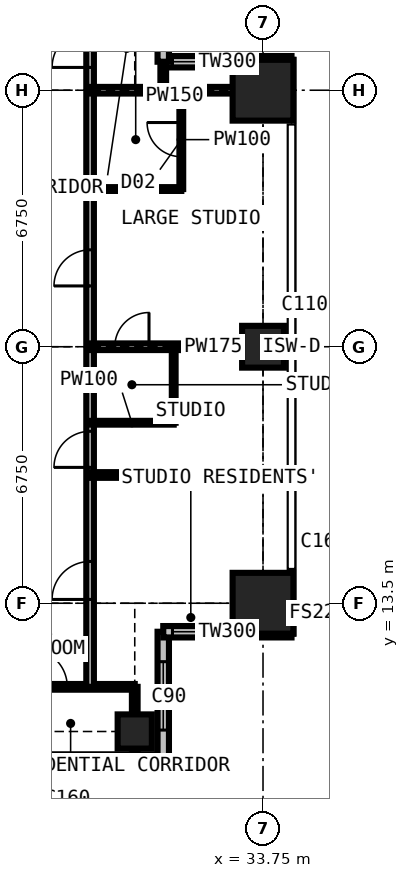
"""IFC4 building model, lengths in metres.
Left out: names, types, materials, properties, quantities, classifications, styles, units other than length and angle.
Written with IfcOpenShell. Run it as: python <this file> out.ifc"""

import sys

from ifc_helpers import new_model, si_unit, direction, frame, frame_2d, origin, origin_2d, place, context, subcontext, project, spatial, rectangle, extrude, element, fill, save


model = new_model("IFC4")
c1 = context("Model", 3, precision=1e-05, world=origin(), true_north=direction((0.0, 1.0)))
c2 = subcontext(c1, "Body", "Model", "MODEL_VIEW")
j1 = project(units=[si_unit("LENGTHUNIT", "METRE"), si_unit("PLANEANGLEUNIT", "RADIAN")], contexts=[c1])
p1 = place(None, origin())
s1 = spatial("IfcSite", under=j1, at=p1, CompositionType="ELEMENT")
p2 = place(p1, origin())
s2 = spatial("IfcBuilding", under=s1, at=p2, CompositionType="ELEMENT")
p3 = place(p2, frame((0.0, 0.0, 207.9)))
s3 = spatial("IfcBuildingStorey", under=s2, at=p3, CompositionType="ELEMENT", Elevation=207.9)
p4 = place(p3, frame((30.375, 10.125, 0.0), z_axis=(0.0, 0.0, 1.0), x_axis=(1.0, 0.0, 0.0)))
e1 = element("IfcColumn", 1, at=p4, inside=s3, PredefinedType="COLUMN", context=c2, shape_type="SweptSolid", body=[
    extrude(rectangle(XDim=0.9, YDim=0.9, at=origin_2d()), origin(), (0.0, 0.0, 1.0), 3.6),
])
p5 = place(p3, frame((33.75, 13.5, 0.0), z_axis=(0.0, 0.0, 1.0), x_axis=(1.0, 0.0, 0.0)))
e2 = element("IfcColumn", 2, at=p5, inside=s3, PredefinedType="COLUMN", context=c2, shape_type="SweptSolid", body=[
    extrude(rectangle(XDim=1.6, YDim=1.6, at=origin_2d()), origin(), (0.0, 0.0, 1.0), 3.6),
])
p6 = place(p3, frame((33.75, 20.25, 0.0), z_axis=(0.0, 0.0, 1.0), x_axis=(1.0, 0.0, 0.0)))
e3 = element("IfcColumn", 3, at=p6, inside=s3, PredefinedType="COLUMN", context=c2, shape_type="SweptSolid", body=[
    extrude(rectangle(XDim=1.1, YDim=1.1, at=origin_2d()), origin(), (0.0, 0.0, 1.0), 3.6),
])
p7 = place(p3, frame((33.75, 27.0, 0.0), z_axis=(0.0, 0.0, 1.0), x_axis=(1.0, 0.0, 0.0)))
e4 = element("IfcColumn", 4, at=p7, inside=s3, PredefinedType="COLUMN", context=c2, shape_type="SweptSolid", body=[
    extrude(rectangle(XDim=1.6, YDim=1.6, at=origin_2d()), origin(), (0.0, 0.0, 1.0), 3.6),
])
p8 = place(p3, frame((34.5, 27.75, 0.0), z_axis=(0.0, 0.0, 1.0), x_axis=(-1.0, 0.0, 0.0)))
e5 = element("IfcWall", 5, at=p8, inside=s3, PredefinedType="SOLIDWALL", context=c2, shape_type="SweptSolid", body=[
    extrude(rectangle(XDim=3.375, YDim=0.3, at=frame_2d((1.688, 0.0))), origin(), (0.0, 0.0, 1.0), 3.375),
])
p9 = place(p8, frame((1.633, 0.0, 0.9)))
e6 = element("IfcOpeningElement", 6, at=p9, cuts=e5, PredefinedType="OPENING", context=c2, shape_type="SweptSolid", body=[
    extrude(rectangle(XDim=1.5, YDim=1.8, at=frame_2d((0.75, 0.9))), frame((0.0, 0.16, 0.0), z_axis=(0.0, -1.0, 0.0), x_axis=(1.0, 0.0, 0.0)), (0.0, 0.0, 1.0), 0.32),
])
p10 = place(p3, frame((31.125, 27.75, 0.0), z_axis=(0.0, 0.0, 1.0), x_axis=(0.0, 1.0, 0.0)))
e7 = element("IfcWall", 7, at=p10, inside=s3, PredefinedType="SOLIDWALL", context=c2, shape_type="SweptSolid", body=[
    extrude(rectangle(XDim=3.375, YDim=0.3, at=frame_2d((1.688, 0.0))), origin(), (0.0, 0.0, 1.0), 3.375),
])
p11 = place(p10, frame((1.663, 0.0, 0.9)))
e8 = element("IfcOpeningElement", 8, at=p11, cuts=e7, PredefinedType="OPENING", context=c2, shape_type="SweptSolid", body=[
    extrude(rectangle(XDim=1.5, YDim=1.8, at=frame_2d((0.75, 0.9))), frame((0.0, 0.16, 0.0), z_axis=(0.0, -1.0, 0.0), x_axis=(1.0, 0.0, 0.0)), (0.0, 0.0, 1.0), 0.32),
])
p12 = place(p3, frame((27.75, 9.375, 0.0), z_axis=(0.0, 0.0, 1.0), x_axis=(1.0, 0.0, 0.0)))
e9 = element("IfcWall", 9, at=p12, inside=s3, PredefinedType="SOLIDWALL", context=c2, shape_type="SweptSolid", body=[
    extrude(rectangle(XDim=3.375, YDim=0.3, at=frame_2d((1.688, 0.0))), origin(), (0.0, 0.0, 1.0), 3.375),
])
p13 = place(p12, frame((0.788, 0.0, 0.6)))
e10 = element("IfcOpeningElement", 10, at=p13, cuts=e9, PredefinedType="OPENING", context=c2, shape_type="SweptSolid", body=[
    extrude(rectangle(XDim=1.8, YDim=2.1, at=frame_2d((0.9, 1.05))), frame((0.0, 0.16, 0.0), z_axis=(0.0, -1.0, 0.0), x_axis=(1.0, 0.0, 0.0)), (0.0, 0.0, 1.0), 0.32),
])
p14 = place(p3, frame((31.125, 9.375, 0.0), z_axis=(0.0, 0.0, 1.0), x_axis=(0.0, 1.0, 0.0)))
e11 = element("IfcWall", 11, at=p14, inside=s3, PredefinedType="SOLIDWALL", context=c2, shape_type="SweptSolid", body=[
    extrude(rectangle(XDim=3.375, YDim=0.3, at=frame_2d((1.688, 0.0))), origin(), (0.0, 0.0, 1.0), 3.375),
])
p15 = place(p14, frame((0.788, 0.0, 0.6)))
e12 = element("IfcOpeningElement", 12, at=p15, cuts=e11, PredefinedType="OPENING", context=c2, shape_type="SweptSolid", body=[
    extrude(rectangle(XDim=1.8, YDim=2.1, at=frame_2d((0.9, 1.05))), frame((0.0, 0.16, 0.0), z_axis=(0.0, -1.0, 0.0), x_axis=(1.0, 0.0, 0.0)), (0.0, 0.0, 1.0), 0.32),
])
p16 = place(p3, frame((31.125, 12.75, 0.0), z_axis=(0.0, 0.0, 1.0), x_axis=(1.0, 0.0, 0.0)))
e13 = element("IfcWall", 13, at=p16, inside=s3, PredefinedType="SOLIDWALL", context=c2, shape_type="SweptSolid", body=[
    extrude(rectangle(XDim=3.375, YDim=0.3, at=frame_2d((1.688, 0.0))), origin(), (0.0, 0.0, 1.0), 3.375),
])
p17 = place(p16, frame((0.242, 0.0, 0.9)))
e14 = element("IfcOpeningElement", 14, at=p17, cuts=e13, PredefinedType="OPENING", context=c2, shape_type="SweptSolid", body=[
    extrude(rectangle(XDim=1.5, YDim=1.8, at=frame_2d((0.75, 0.9))), frame((0.0, 0.16, 0.0), z_axis=(0.0, -1.0, 0.0), x_axis=(1.0, 0.0, 0.0)), (0.0, 0.0, 1.0), 0.32),
])
p18 = place(p3, frame((10.125, 11.3, 0.0), z_axis=(0.0, 0.0, 1.0), x_axis=(1.0, 0.0, 0.0)))
e15 = element("IfcWall", 15, at=p18, inside=s3, PredefinedType="PARTITIONING", context=c2, shape_type="SweptSolid", body=[
    extrude(rectangle(XDim=20.25, YDim=0.15, at=frame_2d((10.125, 0.0))), origin(), (0.0, 0.0, 1.0), 3.375),
])
p19 = place(p18, frame((11.725, 0.0, 0.0)))
e16 = element("IfcOpeningElement", 16, at=p19, cuts=e15, PredefinedType="OPENING", context=c2, shape_type="SweptSolid", body=[
    extrude(rectangle(XDim=0.95, YDim=2.2, at=frame_2d((0.475, 1.1))), frame((0.0, 0.085, 0.0), z_axis=(0.0, -1.0, 0.0), x_axis=(1.0, 0.0, 0.0)), (0.0, 0.0, 1.0), 0.17),
])
p20 = place(p18, frame((4.975, 0.0, 0.0)))
e17 = element("IfcOpeningElement", 17, at=p20, cuts=e15, PredefinedType="OPENING", context=c2, shape_type="SweptSolid", body=[
    extrude(rectangle(XDim=0.95, YDim=2.2, at=frame_2d((0.475, 1.1))), frame((0.0, 0.085, 0.0), z_axis=(0.0, -1.0, 0.0), x_axis=(1.0, 0.0, 0.0)), (0.0, 0.0, 1.0), 0.17),
])
p21 = place(p18, frame((2.2, 0.0, 0.0)))
e18 = element("IfcOpeningElement", 18, at=p21, cuts=e15, PredefinedType="OPENING", context=c2, shape_type="SweptSolid", body=[
    extrude(rectangle(XDim=0.95, YDim=2.2, at=frame_2d((0.475, 1.1))), frame((0.0, 0.085, 0.0), z_axis=(0.0, -1.0, 0.0), x_axis=(1.0, 0.0, 0.0)), (0.0, 0.0, 1.0), 0.17),
])
p22 = place(p18, frame((17.475, 0.0, 0.0)))
e19 = element("IfcOpeningElement", 19, at=p22, cuts=e15, PredefinedType="OPENING", context=c2, shape_type="SweptSolid", body=[
    extrude(rectangle(XDim=1.0, YDim=2.2, at=frame_2d((0.5, 1.1))), frame((0.0, 0.085, 0.0), z_axis=(0.0, -1.0, 0.0), x_axis=(1.0, 0.0, 0.0)), (0.0, 0.0, 1.0), 0.17),
])
p23 = place(p3, frame((29.2, 11.3, 0.0), z_axis=(0.0, 0.0, 1.0), x_axis=(0.0, 1.0, 0.0)))
e20 = element("IfcWall", 20, at=p23, inside=s3, PredefinedType="PARTITIONING", context=c2, shape_type="SweptSolid", body=[
    extrude(rectangle(XDim=17.9, YDim=0.2, at=frame_2d((8.95, 0.0))), origin(), (0.0, 0.0, 1.0), 3.375),
])
p24 = place(p23, frame((2.3, 0.0, 0.0)))
e21 = element("IfcOpeningElement", 21, at=p24, cuts=e20, PredefinedType="OPENING", context=c2, shape_type="SweptSolid", body=[
    extrude(rectangle(XDim=1.0, YDim=2.2, at=frame_2d((0.5, 1.1))), frame((0.0, 0.11, 0.0), z_axis=(0.0, -1.0, 0.0), x_axis=(1.0, 0.0, 0.0)), (0.0, 0.0, 1.0), 0.22),
])
p25 = place(p23, frame((10.55, 0.0, 0.0)))
e22 = element("IfcOpeningElement", 22, at=p25, cuts=e20, PredefinedType="OPENING", context=c2, shape_type="SweptSolid", body=[
    extrude(rectangle(XDim=0.95, YDim=2.2, at=frame_2d((0.475, 1.1))), frame((0.0, 0.11, 0.0), z_axis=(0.0, -1.0, 0.0), x_axis=(1.0, 0.0, 0.0)), (0.0, 0.0, 1.0), 0.22),
])
p26 = place(p23, frame((5.775, 0.0, 0.0)))
e23 = element("IfcOpeningElement", 23, at=p26, cuts=e20, PredefinedType="OPENING", context=c2, shape_type="SweptSolid", body=[
    extrude(rectangle(XDim=0.95, YDim=2.2, at=frame_2d((0.475, 1.1))), frame((0.0, 0.11, 0.0), z_axis=(0.0, -1.0, 0.0), x_axis=(1.0, 0.0, 0.0)), (0.0, 0.0, 1.0), 0.22),
])
p27 = place(p23, frame((16.3, 0.0, 0.0)))
e24 = element("IfcOpeningElement", 24, at=p27, cuts=e20, PredefinedType="OPENING", context=c2, shape_type="SweptSolid", body=[
    extrude(rectangle(XDim=1.0, YDim=2.2, at=frame_2d((0.5, 1.1))), frame((0.0, 0.11, 0.0), z_axis=(0.0, -1.0, 0.0), x_axis=(1.0, 0.0, 0.0)), (0.0, 0.0, 1.0), 0.22),
])
p28 = place(p3, frame((29.2, 16.875, 0.0), z_axis=(0.0, 0.0, 1.0), x_axis=(1.0, 0.0, 0.0)))
e25 = element("IfcWall", 25, at=p28, inside=s3, PredefinedType="PARTITIONING", context=c2, shape_type="SweptSolid", body=[
    extrude(rectangle(XDim=5.284, YDim=0.15, at=frame_2d((2.642, 0.0))), origin(), (0.0, 0.0, 1.0), 3.375),
])
p29 = place(p3, frame((29.2, 18.25, 0.0), z_axis=(0.0, 0.0, 1.0), x_axis=(1.0, 0.0, 0.0)))
e26 = element("IfcWall", 26, at=p29, inside=s3, PredefinedType="PARTITIONING", context=c2, shape_type="SweptSolid", body=[
    extrude(rectangle(XDim=2.2, YDim=0.1, at=frame_2d((1.1, 0.0))), origin(), (0.0, 0.0, 1.0), 3.375),
])
p30 = place(p3, frame((29.2, 20.25, 0.0), z_axis=(0.0, 0.0, 1.0), x_axis=(1.0, 0.0, 0.0)))
e27 = element("IfcWall", 27, at=p30, inside=s3, PredefinedType="PARTITIONING", context=c2, shape_type="SweptSolid", body=[
    extrude(rectangle(XDim=5.284, YDim=0.175, at=frame_2d((2.642, 0.0))), origin(), (0.0, 0.0, 1.0), 2.877),
])
p31 = place(p30, frame((0.65, 0.0, 0.0)))
e28 = element("IfcOpeningElement", 28, at=p31, cuts=e27, PredefinedType="OPENING", context=c2, shape_type="SweptSolid", body=[
    extrude(rectangle(XDim=0.9, YDim=2.2, at=frame_2d((0.45, 1.1))), frame((0.0, 0.097, 0.0), z_axis=(0.0, -1.0, 0.0), x_axis=(1.0, 0.0, 0.0)), (0.0, 0.0, 1.0), 0.195),
])
p32 = place(p3, frame((29.2, 24.4, 0.0), z_axis=(0.0, 0.0, 1.0), x_axis=(1.0, 0.0, 0.0)))
e29 = element("IfcWall", 29, at=p32, inside=s3, PredefinedType="PARTITIONING", context=c2, shape_type="SweptSolid", body=[
    extrude(rectangle(XDim=2.4, YDim=0.1, at=frame_2d((1.2, 0.0))), origin(), (0.0, 0.0, 1.0), 3.375),
])
p33 = place(p3, frame((29.2, 27.0, 0.0), z_axis=(0.0, 0.0, 1.0), x_axis=(1.0, 0.0, 0.0)))
e30 = element("IfcWall", 30, at=p33, inside=s3, PredefinedType="PARTITIONING", context=c2, shape_type="SweptSolid", body=[
    extrude(rectangle(XDim=5.284, YDim=0.175, at=frame_2d((2.642, 0.0))), origin(), (0.0, 0.0, 1.0), 2.877),
])
p34 = place(p3, frame((30.375, 9.525, 0.0), z_axis=(0.0, 0.0, 1.0), x_axis=(0.0, 1.0, 0.0)))
e31 = element("IfcWall", 31, at=p34, inside=s3, PredefinedType="PARTITIONING", context=c2, shape_type="SweptSolid", body=[
    extrude(rectangle(XDim=1.775, YDim=0.15, at=frame_2d((0.888, 0.0))), origin(), (0.0, 0.0, 1.0), 2.877),
])
p35 = place(p3, frame((31.125, 27.0, 0.0), z_axis=(0.0, 0.0, 1.0), x_axis=(0.0, 1.0, 0.0)))
e32 = element("IfcWall", 32, at=p35, inside=s3, PredefinedType="PARTITIONING", context=c2, shape_type="SweptSolid", body=[
    extrude(rectangle(XDim=0.734, YDim=0.15, at=frame_2d((0.367, 0.0))), origin(), (0.0, 0.0, 1.0), 3.375),
])
p36 = place(p3, frame((31.4, 18.25, 0.0), z_axis=(0.0, 0.0, 1.0), x_axis=(0.0, 1.0, 0.0)))
e33 = element("IfcWall", 33, at=p36, inside=s3, PredefinedType="PARTITIONING", context=c2, shape_type="SweptSolid", body=[
    extrude(rectangle(XDim=2.0, YDim=0.1, at=frame_2d((1.0, 0.0))), origin(), (0.0, 0.0, 1.0), 3.375),
])
p37 = place(p3, frame((31.6, 24.4, 0.0), z_axis=(0.0, 0.0, 1.0), x_axis=(0.0, 1.0, 0.0)))
e34 = element("IfcWall", 34, at=p37, inside=s3, PredefinedType="PARTITIONING", context=c2, shape_type="SweptSolid", body=[
    extrude(rectangle(XDim=2.6, YDim=0.1, at=frame_2d((1.3, 0.0))), origin(), (0.0, 0.0, 1.0), 3.375),
])
p38 = place(p37, frame((0.85, 0.0, 0.0)))
e35 = element("IfcOpeningElement", 35, at=p38, cuts=e34, PredefinedType="OPENING", context=c2, shape_type="SweptSolid", body=[
    extrude(rectangle(XDim=0.9, YDim=2.2, at=frame_2d((0.45, 1.1))), frame((0.0, 0.06, 0.0), z_axis=(0.0, -1.0, 0.0), x_axis=(1.0, 0.0, 0.0)), (0.0, 0.0, 1.0), 0.12),
])
p39 = place(p9, origin())
e36 = element("IfcWindow", 36, at=p39, inside=s3, PartitioningType="SINGLE_PANEL", PredefinedType="WINDOW", context=c2, shape_type="SweptSolid", body=[
    extrude(rectangle(XDim=1.5, YDim=1.8, at=frame_2d((0.75, 0.9))), frame((0.0, 0.03, 0.0), z_axis=(0.0, -1.0, 0.0), x_axis=(1.0, 0.0, 0.0)), (0.0, 0.0, 1.0), 0.06),
])
fill(e6, e36)
p40 = place(p13, origin())
e37 = element("IfcWindow", 37, at=p40, inside=s3, PartitioningType="SINGLE_PANEL", PredefinedType="WINDOW", context=c2, shape_type="SweptSolid", body=[
    extrude(rectangle(XDim=1.8, YDim=2.1, at=frame_2d((0.9, 1.05))), frame((0.0, 0.03, 0.0), z_axis=(0.0, -1.0, 0.0), x_axis=(1.0, 0.0, 0.0)), (0.0, 0.0, 1.0), 0.06),
])
fill(e10, e37)
p41 = place(p15, origin())
e38 = element("IfcWindow", 38, at=p41, inside=s3, PartitioningType="SINGLE_PANEL", PredefinedType="WINDOW", context=c2, shape_type="SweptSolid", body=[
    extrude(rectangle(XDim=1.8, YDim=2.1, at=frame_2d((0.9, 1.05))), frame((0.0, 0.03, 0.0), z_axis=(0.0, -1.0, 0.0), x_axis=(1.0, 0.0, 0.0)), (0.0, 0.0, 1.0), 0.06),
])
fill(e12, e38)
p42 = place(p17, origin())
e39 = element("IfcWindow", 39, at=p42, inside=s3, PartitioningType="SINGLE_PANEL", PredefinedType="WINDOW", context=c2, shape_type="SweptSolid", body=[
    extrude(rectangle(XDim=1.5, YDim=1.8, at=frame_2d((0.75, 0.9))), frame((0.0, 0.03, 0.0), z_axis=(0.0, -1.0, 0.0), x_axis=(1.0, 0.0, 0.0)), (0.0, 0.0, 1.0), 0.06),
])
fill(e14, e39)
p43 = place(p22, origin())
e40 = element("IfcDoor", 40, at=p43, inside=s3, OperationType="SINGLE_SWING_LEFT", PredefinedType="DOOR", context=c2, shape_type="SweptSolid", body=[
    extrude(rectangle(XDim=1.0, YDim=2.2, at=frame_2d((0.5, 1.1))), frame((0.0, 0.025, 0.0), z_axis=(0.0, -1.0, 0.0), x_axis=(1.0, 0.0, 0.0)), (0.0, 0.0, 1.0), 0.05),
])
fill(e19, e40)
p44 = place(p24, origin())
e41 = element("IfcDoor", 41, at=p44, inside=s3, OperationType="SINGLE_SWING_LEFT", PredefinedType="DOOR", context=c2, shape_type="SweptSolid", body=[
    extrude(rectangle(XDim=1.0, YDim=2.2, at=frame_2d((0.5, 1.1))), frame((0.0, 0.025, 0.0), z_axis=(0.0, -1.0, 0.0), x_axis=(1.0, 0.0, 0.0)), (0.0, 0.0, 1.0), 0.05),
])
fill(e21, e41)
p45 = place(p25, origin())
e42 = element("IfcDoor", 42, at=p45, inside=s3, OperationType="SINGLE_SWING_LEFT", PredefinedType="DOOR", context=c2, shape_type="SweptSolid", body=[
    extrude(rectangle(XDim=0.95, YDim=2.2, at=frame_2d((0.475, 1.1))), frame((0.0, 0.025, 0.0), z_axis=(0.0, -1.0, 0.0), x_axis=(1.0, 0.0, 0.0)), (0.0, 0.0, 1.0), 0.05),
])
fill(e22, e42)
p46 = place(p38, origin())
e43 = element("IfcDoor", 43, at=p46, inside=s3, OperationType="SINGLE_SWING_RIGHT", PredefinedType="DOOR", context=c2, shape_type="SweptSolid", body=[
    extrude(rectangle(XDim=0.9, YDim=2.2, at=frame_2d((0.45, 1.1))), frame((0.0, 0.025, 0.0), z_axis=(0.0, -1.0, 0.0), x_axis=(1.0, 0.0, 0.0)), (0.0, 0.0, 1.0), 0.05),
])
fill(e35, e43)
p47 = place(p26, origin())
e44 = element("IfcDoor", 44, at=p47, inside=s3, OperationType="SINGLE_SWING_LEFT", PredefinedType="DOOR", context=c2, shape_type="SweptSolid", body=[
    extrude(rectangle(XDim=0.95, YDim=2.2, at=frame_2d((0.475, 1.1))), frame((0.0, 0.025, 0.0), z_axis=(0.0, -1.0, 0.0), x_axis=(1.0, 0.0, 0.0)), (0.0, 0.0, 1.0), 0.05),
])
fill(e23, e44)
p48 = place(p31, origin())
e45 = element("IfcDoor", 45, at=p48, inside=s3, OperationType="SINGLE_SWING_RIGHT", PredefinedType="DOOR", context=c2, shape_type="SweptSolid", body=[
    extrude(rectangle(XDim=0.9, YDim=2.2, at=frame_2d((0.45, 1.1))), frame((0.0, 0.025, 0.0), z_axis=(0.0, -1.0, 0.0), x_axis=(1.0, 0.0, 0.0)), (0.0, 0.0, 1.0), 0.05),
])
fill(e28, e45)
p49 = place(p27, origin())
e46 = element("IfcDoor", 46, at=p49, inside=s3, OperationType="SINGLE_SWING_LEFT", PredefinedType="DOOR", context=c2, shape_type="SweptSolid", body=[
    extrude(rectangle(XDim=1.0, YDim=2.2, at=frame_2d((0.5, 1.1))), frame((0.0, 0.025, 0.0), z_axis=(0.0, -1.0, 0.0), x_axis=(1.0, 0.0, 0.0)), (0.0, 0.0, 1.0), 0.05),
])
fill(e24, e46)
save(model, sys.argv[1])
